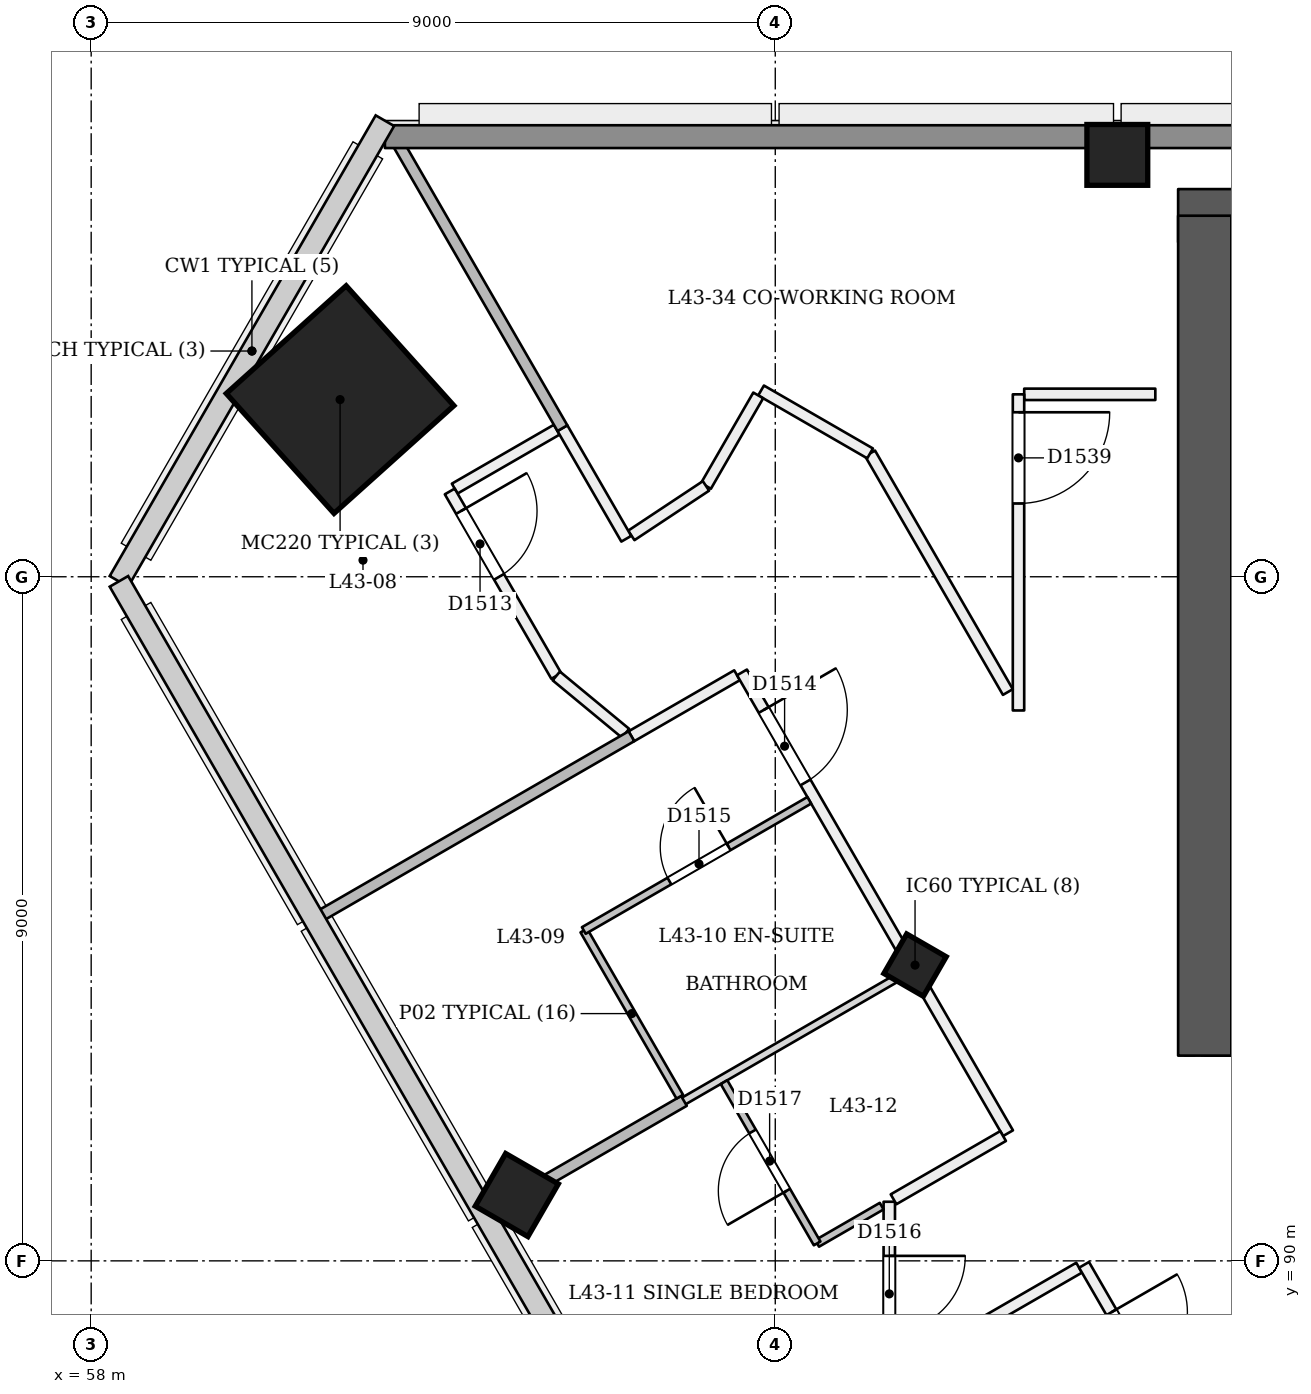
"""IFC4 building model, lengths in metres.
Left out: names, types, materials, properties, quantities, classifications, styles, units other than length and angle.
Written with IfcOpenShell. Run it as: python <this file> out.ifc"""

import sys

from ifc_helpers import new_model, si_unit, direction, frame, frame_2d, origin, origin_2d, place, context, subcontext, project, spatial, rectangle, extrude, element, fill, save


model = new_model("IFC4")
c1 = context("Model", 3, precision=1e-05, world=origin(), true_north=direction((0.0, 1.0)))
c2 = subcontext(c1, "Body", "Model", "MODEL_VIEW")
j1 = project(units=[si_unit("LENGTHUNIT", "METRE"), si_unit("PLANEANGLEUNIT", "RADIAN")], contexts=[c1])
p1 = place(None, origin())
s1 = spatial("IfcSite", under=j1, at=p1, CompositionType="ELEMENT")
p2 = place(p1, origin())
s2 = spatial("IfcBuilding", under=s1, at=p2, CompositionType="ELEMENT")
p3 = place(p2, frame((0.0, 0.0, 167.4)))
s3 = spatial("IfcBuildingStorey", under=s2, at=p3, CompositionType="ELEMENT", Elevation=167.4)
p4 = place(p3, frame((72.65, 93.05, 0.0), z_axis=(0.0, 0.0, 1.0), x_axis=(1.0, 0.0, 0.0)))
e1 = element("IfcWall", 1, at=p4, inside=s3, PredefinedType="SHEAR", context=c2, shape_type="SweptSolid", body=[
    extrude(rectangle(XDim=25.05, YDim=0.7, at=frame_2d((12.525, 0.0))), origin(), (0.0, 0.0, 1.0), 3.6),
])
p5 = place(p4, frame((1.15, 0.0, 0.0)))
e2 = element("IfcOpeningElement", 2, at=p5, cuts=e1, PredefinedType="OPENING", context=c2, shape_type="SweptSolid", body=[
    extrude(rectangle(XDim=1.2, YDim=2.1, at=frame_2d((0.6, 1.05))), frame((0.0, 0.36, 0.0), z_axis=(0.0, -1.0, 0.0), x_axis=(1.0, 0.0, 0.0)), (0.0, 0.0, 1.0), 0.721),
])
p6 = place(p4, frame((3.35, 0.0, 0.0)))
e3 = element("IfcOpeningElement", 3, at=p6, cuts=e1, PredefinedType="OPENING", context=c2, shape_type="SweptSolid", body=[
    extrude(rectangle(XDim=1.2, YDim=2.1, at=frame_2d((0.6, 1.05))), frame((0.0, 0.36, 0.0), z_axis=(0.0, -1.0, 0.0), x_axis=(1.0, 0.0, 0.0)), (0.0, 0.0, 1.0), 0.721),
])
p7 = place(p4, frame((13.35, 0.0, 0.0)))
e4 = element("IfcOpeningElement", 4, at=p7, cuts=e1, PredefinedType="OPENING", context=c2, shape_type="SweptSolid", body=[
    extrude(rectangle(XDim=1.2, YDim=2.1, at=frame_2d((0.6, 1.05))), frame((0.0, 0.36, 0.0), z_axis=(0.0, -1.0, 0.0), x_axis=(1.0, 0.0, 0.0)), (0.0, 0.0, 1.0), 0.721),
])
p8 = place(p4, frame((16.762, 0.0, 0.0)))
e5 = element("IfcOpeningElement", 5, at=p8, cuts=e1, PredefinedType="OPENING", context=c2, shape_type="SweptSolid", body=[
    extrude(rectangle(XDim=1.0, YDim=2.1, at=frame_2d((0.5, 1.05))), frame((0.0, 0.36, 0.0), z_axis=(0.0, -1.0, 0.0), x_axis=(1.0, 0.0, 0.0)), (0.0, 0.0, 1.0), 0.721),
])
p9 = place(p4, frame((20.65, 0.0, 0.0)))
e6 = element("IfcOpeningElement", 6, at=p9, cuts=e1, PredefinedType="OPENING", context=c2, shape_type="SweptSolid", body=[
    extrude(rectangle(XDim=1.0, YDim=2.1, at=frame_2d((0.5, 1.05))), frame((0.0, 0.36, 0.0), z_axis=(0.0, -1.0, 0.0), x_axis=(1.0, 0.0, 0.0)), (0.0, 0.0, 1.0), 0.721),
])
p10 = place(p4, frame((23.087, 0.0, 0.0)))
e7 = element("IfcOpeningElement", 7, at=p10, cuts=e1, PredefinedType="OPENING", context=c2, shape_type="SweptSolid", body=[
    extrude(rectangle(XDim=1.0, YDim=2.1, at=frame_2d((0.5, 1.05))), frame((0.0, 0.36, 0.0), z_axis=(0.0, -1.0, 0.0), x_axis=(1.0, 0.0, 0.0)), (0.0, 0.0, 1.0), 0.721),
])
p11 = place(p3, frame((97.35, 103.75, 0.0), z_axis=(0.0, 0.0, 1.0), x_axis=(-1.0, 0.0, 0.0)))
e8 = element("IfcWall", 8, at=p11, inside=s3, PredefinedType="SHEAR", context=c2, shape_type="SweptSolid", body=[
    extrude(rectangle(XDim=25.05, YDim=0.7, at=frame_2d((12.525, 0.0))), origin(), (0.0, 0.0, 1.0), 3.6),
])
p12 = place(p3, frame((72.65, 103.75, 0.0), z_axis=(0.0, 0.0, 1.0), x_axis=(0.0, -1.0, 0.0)))
e9 = element("IfcWall", 9, at=p12, inside=s3, PredefinedType="SHEAR", context=c2, shape_type="SweptSolid", body=[
    extrude(rectangle(XDim=11.05, YDim=0.7, at=frame_2d((5.525, 0.0))), origin(), (0.0, 0.0, 1.0), 3.6),
])
p13 = place(p3, frame((68.812, 93.844, -0.018), z_axis=(0.022222910879, 0.038415824599, 0.999014697916), x_axis=(-0.866021322354, -0.498527672539, 0.038434736118)))
e10 = element("IfcColumn", 10, at=p13, inside=s3, PredefinedType="COLUMN", context=c2, shape_type="SweptSolid", body=[
    extrude(rectangle(XDim=0.6, YDim=0.6, at=origin_2d()), origin(), (0.0, 0.0, 1.0), 3.604),
])
p14 = place(p3, frame((61.24, 101.32, 0.0), z_axis=(0.028401814599, 0.009218727412, 0.999554076572), x_axis=(-0.865123051177, 0.5011623582, 0.019959885917)))
e11 = element("IfcColumn", 11, at=p14, inside=s3, PredefinedType="COLUMN", context=c2, shape_type="SweptSolid", body=[
    extrude(rectangle(XDim=2.12, YDim=2.12, at=origin_2d()), origin(), (0.0, 0.0, 1.0), 3.602),
])
p15 = place(p3, frame((71.5, 104.55, 0.0), z_axis=(0.0, 0.0, 1.0), x_axis=(1.0, 0.0, 0.0)))
e12 = element("IfcColumn", 12, at=p15, inside=s3, PredefinedType="COLUMN", context=c2, shape_type="SweptSolid", body=[
    extrude(rectangle(XDim=0.8, YDim=0.8, at=origin_2d()), origin(), (0.0, 0.0, 1.0), 3.6),
])
p16 = place(p3, frame((63.572, 90.819, -0.024), z_axis=(0.02222134892, 0.038480872521, 0.999012229206), x_axis=(-0.865642081321, -0.499182199018, 0.038482713395)))
e13 = element("IfcColumn", 13, at=p16, inside=s3, PredefinedType="COLUMN", context=c2, shape_type="SweptSolid", body=[
    extrude(rectangle(XDim=0.8, YDim=0.8, at=origin_2d()), origin(), (0.0, 0.0, 1.0), 3.604),
])
p17 = place(p3, frame((64.125, 100.935, 0.0), z_axis=(0.0, 0.0, 1.0), x_axis=(-0.865975732936, -0.500086022567, 0.0)))
e14 = element("IfcWall", 14, at=p17, inside=s3, PredefinedType="PARTITIONING", context=c2, shape_type="SweptSolid", body=[
    extrude(rectangle(XDim=1.55, YDim=0.15, at=frame_2d((0.775, 0.0))), origin(), (0.0, 0.0, 1.0), 3.15),
])
p18 = place(p3, frame((62.718, 100.122, 0.0), z_axis=(0.0, 0.0, 1.0), x_axis=(0.499961213752, -0.866047795877, 0.0)))
e15 = element("IfcWall", 15, at=p18, inside=s3, PredefinedType="PARTITIONING", context=c2, shape_type="SweptSolid", body=[
    extrude(rectangle(XDim=2.803, YDim=0.15, at=frame_2d((1.401, 0.0))), origin(), (0.0, 0.0, 1.0), 3.15),
])
p19 = place(p18, frame((0.297, 0.0, 0.0)))
e16 = element("IfcOpeningElement", 16, at=p19, cuts=e15, PredefinedType="OPENING", context=c2, shape_type="SweptSolid", body=[
    extrude(rectangle(XDim=1.0, YDim=2.1, at=frame_2d((0.5, 1.05))), frame((0.0, 0.085, 0.0), z_axis=(0.0, -1.0, 0.0), x_axis=(1.0, 0.0, 0.0)), (0.0, 0.0, 1.0), 0.171),
])
p20 = place(p3, frame((64.119, 97.695, 0.0), z_axis=(0.0, 0.0, 1.0), x_axis=(0.770653073213, -0.637254926028, 0.0)))
e17 = element("IfcWall", 17, at=p20, inside=s3, PredefinedType="PARTITIONING", context=c2, shape_type="SweptSolid", body=[
    extrude(rectangle(XDim=1.182, YDim=0.15, at=frame_2d((0.591, 0.0))), origin(), (0.0, 0.0, 1.0), 3.15),
])
p21 = place(p3, frame((65.107, 96.902, 0.0), z_axis=(0.0, 0.0, 1.0), x_axis=(0.866053882819, 0.499950669621, 0.0)))
e18 = element("IfcWall", 18, at=p21, inside=s3, PredefinedType="PARTITIONING", context=c2, shape_type="SweptSolid", body=[
    extrude(rectangle(XDim=1.605, YDim=0.15, at=frame_2d((0.803, 0.0))), origin(), (0.0, 0.0, 1.0), 3.15),
])
p22 = place(p3, frame((66.562, 97.742, 0.0), z_axis=(0.0, 0.0, 1.0), x_axis=(0.500010275428, -0.866019471182, 0.0)))
e19 = element("IfcWall", 19, at=p22, inside=s3, PredefinedType="PARTITIONING", context=c2, shape_type="SweptSolid", body=[
    extrude(rectangle(XDim=7.0, YDim=0.15, at=frame_2d((3.5, 0.0))), origin(), (0.0, 0.0, 1.0), 2.75),
])
p23 = place(p22, frame((0.571, 0.0, 0.0)))
e20 = element("IfcOpeningElement", 20, at=p23, cuts=e19, PredefinedType="OPENING", context=c2, shape_type="SweptSolid", body=[
    extrude(rectangle(XDim=1.1, YDim=2.1, at=frame_2d((0.55, 1.05))), frame((0.0, 0.085, 0.0), z_axis=(0.0, -1.0, 0.0), x_axis=(1.0, 0.0, 0.0)), (0.0, 0.0, 1.0), 0.171),
])
p24 = place(p3, frame((68.5, 90.778, 0.0), z_axis=(0.0, 0.0, 1.0), x_axis=(0.0, -1.0, 0.0)))
e21 = element("IfcWall", 21, at=p24, inside=s3, PredefinedType="PARTITIONING", context=c2, shape_type="SweptSolid", body=[
    extrude(rectangle(XDim=2.179, YDim=0.15, at=frame_2d((1.09, 0.0))), origin(), (0.0, 0.0, 1.0), 3.15),
])
p25 = place(p24, frame((0.712, 0.0, 0.0)))
e22 = element("IfcOpeningElement", 22, at=p25, cuts=e21, PredefinedType="OPENING", context=c2, shape_type="SweptSolid", body=[
    extrude(rectangle(XDim=1.0, YDim=2.1, at=frame_2d((0.5, 1.05))), frame((0.0, 0.085, 0.0), z_axis=(0.0, -1.0, 0.0), x_axis=(1.0, 0.0, 0.0)), (0.0, 0.0, 1.0), 0.171),
])
p26 = place(p3, frame((69.997, 91.642, 0.0), z_axis=(0.0, 0.0, 1.0), x_axis=(-0.866031670005, -0.49998914643, 0.0)))
e23 = element("IfcWall", 23, at=p26, inside=s3, PredefinedType="PARTITIONING", context=c2, shape_type="SweptSolid", body=[
    extrude(rectangle(XDim=1.664, YDim=0.15, at=frame_2d((0.832, 0.0))), origin(), (0.0, 0.0, 1.0), 3.15),
])
p27 = place(p3, frame((68.572, 88.51, 0.0), z_axis=(0.0, 0.0, 1.0), x_axis=(0.866056369097, 0.49994636267, 0.0)))
e24 = element("IfcWall", 24, at=p27, inside=s3, PredefinedType="PARTITIONING", context=c2, shape_type="SweptSolid", body=[
    extrude(rectangle(XDim=2.8, YDim=0.15, at=frame_2d((1.4, 0.0))), origin(), (0.0, 0.0, 1.0), 3.15),
])
p28 = place(p3, frame((71.062, 89.948, 0.0), z_axis=(0.0, 0.0, 1.0), x_axis=(0.500000184135, -0.866025297474, 0.0)))
e25 = element("IfcWall", 25, at=p28, inside=s3, PredefinedType="PARTITIONING", context=c2, shape_type="SweptSolid", body=[
    extrude(rectangle(XDim=27.875, YDim=0.15, at=frame_2d((13.938, 0.0))), origin(), (0.0, 0.0, 1.0), 2.75),
])
p29 = place(p28, frame((0.72, 0.0, 0.0)))
e26 = element("IfcOpeningElement", 26, at=p29, cuts=e25, PredefinedType="OPENING", context=c2, shape_type="SweptSolid", body=[
    extrude(rectangle(XDim=1.0, YDim=2.1, at=frame_2d((0.5, 1.05))), frame((0.0, 0.085, 0.0), z_axis=(0.0, -1.0, 0.0), x_axis=(1.0, 0.0, 0.0)), (0.0, 0.0, 1.0), 0.171),
])
p30 = place(p28, frame((7.28, 0.0, 0.0)))
e27 = element("IfcOpeningElement", 27, at=p30, cuts=e25, PredefinedType="OPENING", context=c2, shape_type="SweptSolid", body=[
    extrude(rectangle(XDim=1.0, YDim=2.1, at=frame_2d((0.5, 1.05))), frame((0.0, 0.085, 0.0), z_axis=(0.0, -1.0, 0.0), x_axis=(1.0, 0.0, 0.0)), (0.0, 0.0, 1.0), 0.171),
])
p31 = place(p28, frame((11.9, 0.0, 0.0)))
e28 = element("IfcOpeningElement", 28, at=p31, cuts=e25, PredefinedType="OPENING", context=c2, shape_type="SweptSolid", body=[
    extrude(rectangle(XDim=1.2, YDim=2.1, at=frame_2d((0.6, 1.05))), frame((0.0, 0.085, 0.0), z_axis=(0.0, -1.0, 0.0), x_axis=(1.0, 0.0, 0.0)), (0.0, 0.0, 1.0), 0.171),
])
p32 = place(p28, frame((19.75, 0.0, 0.0)))
e29 = element("IfcOpeningElement", 29, at=p32, cuts=e25, PredefinedType="OPENING", context=c2, shape_type="SweptSolid", body=[
    extrude(rectangle(XDim=1.0, YDim=2.1, at=frame_2d((0.5, 1.05))), frame((0.0, 0.085, 0.0), z_axis=(0.0, -1.0, 0.0), x_axis=(1.0, 0.0, 0.0)), (0.0, 0.0, 1.0), 0.171),
])
p33 = place(p28, frame((26.051, 0.0, 0.0)))
e30 = element("IfcOpeningElement", 30, at=p33, cuts=e25, PredefinedType="OPENING", context=c2, shape_type="SweptSolid", body=[
    extrude(rectangle(XDim=1.2, YDim=2.1, at=frame_2d((0.6, 1.05))), frame((0.0, 0.085, 0.0), z_axis=(0.0, -1.0, 0.0), x_axis=(1.0, 0.0, 0.0)), (0.0, 0.0, 1.0), 0.171),
])
p34 = place(p3, frame((72.0, 101.4, 0.0), z_axis=(0.0, 0.0, 1.0), x_axis=(-1.0, 0.0, 0.0)))
e31 = element("IfcWall", 31, at=p34, inside=s3, PredefinedType="PARTITIONING", context=c2, shape_type="SweptSolid", body=[
    extrude(rectangle(XDim=1.725, YDim=0.15, at=frame_2d((0.863, 0.0))), origin(), (0.0, 0.0, 1.0), 3.15),
])
p35 = place(p3, frame((70.2, 101.4, 0.0), z_axis=(0.0, 0.0, 1.0), x_axis=(0.0, -1.0, 0.0)))
e32 = element("IfcWall", 32, at=p35, inside=s3, PredefinedType="PARTITIONING", context=c2, shape_type="SweptSolid", body=[
    extrude(rectangle(XDim=4.159, YDim=0.15, at=frame_2d((2.08, 0.0))), origin(), (0.0, 0.0, 1.0), 3.15),
])
p36 = place(p35, frame((0.236, 0.0, 0.0)))
e33 = element("IfcOpeningElement", 33, at=p36, cuts=e32, PredefinedType="OPENING", context=c2, shape_type="SweptSolid", body=[
    extrude(rectangle(XDim=1.2, YDim=2.1, at=frame_2d((0.6, 1.05))), frame((0.0, 0.085, 0.0), z_axis=(0.0, -1.0, 0.0), x_axis=(1.0, 0.0, 0.0)), (0.0, 0.0, 1.0), 0.171),
])
p37 = place(p3, frame((70.06, 97.483, 0.0), z_axis=(0.0, 0.0, 1.0), x_axis=(-0.500013916395, 0.866017369001, 0.0)))
e34 = element("IfcWall", 34, at=p37, inside=s3, PredefinedType="PARTITIONING", context=c2, shape_type="SweptSolid", body=[
    extrude(rectangle(XDim=3.625, YDim=0.15, at=frame_2d((1.813, 0.0))), origin(), (0.0, 0.0, 1.0), 3.15),
])
p38 = place(p3, frame((68.247, 100.623, 0.0), z_axis=(0.0, 0.0, 1.0), x_axis=(-0.866011236992, 0.500024536802, 0.0)))
e35 = element("IfcWall", 35, at=p38, inside=s3, PredefinedType="PARTITIONING", context=c2, shape_type="SweptSolid", body=[
    extrude(rectangle(XDim=1.656, YDim=0.15, at=frame_2d((0.828, 0.0))), origin(), (0.0, 0.0, 1.0), 3.15),
])
p39 = place(p3, frame((66.776, 101.386, 0.0), z_axis=(0.0, 0.0, 1.0), x_axis=(-0.499958106649, -0.866049589571, 0.0)))
e36 = element("IfcWall", 36, at=p39, inside=s3, PredefinedType="PARTITIONING", context=c2, shape_type="SweptSolid", body=[
    extrude(rectangle(XDim=1.375, YDim=0.15, at=frame_2d((0.688, 0.0))), origin(), (0.0, 0.0, 1.0), 3.15),
])
p40 = place(p3, frame((66.088, 100.195, 0.0), z_axis=(0.0, 0.0, 1.0), x_axis=(-0.833577242452, -0.552402915331, 0.0)))
e37 = element("IfcWall", 37, at=p40, inside=s3, PredefinedType="PARTITIONING", context=c2, shape_type="SweptSolid", body=[
    extrude(rectangle(XDim=1.178, YDim=0.15, at=frame_2d((0.589, 0.0))), origin(), (0.0, 0.0, 1.0), 3.15),
])
p41 = place(p3, frame((65.04, 99.5, 0.0), z_axis=(0.0, 0.0, 1.0), x_axis=(-0.500062097304, 0.865989548921, 0.0)))
e38 = element("IfcWall", 38, at=p41, inside=s3, PredefinedType="PARTITIONING", context=c2, shape_type="SweptSolid", body=[
    extrude(rectangle(XDim=1.68, YDim=0.15, at=frame_2d((0.84, 0.0))), origin(), (0.0, 0.0, 1.0), 3.15),
])
p42 = place(p3, frame((61.002, 94.532, 0.0), z_axis=(0.0, 0.0, 1.0), x_axis=(0.866015756104, 0.5000167099, 0.0)))
e39 = element("IfcWall", 39, at=p42, inside=s3, PredefinedType="PARTITIONING", context=c2, shape_type="SweptSolid", body=[
    extrude(rectangle(XDim=4.74, YDim=0.15, at=frame_2d((2.37, 0.0))), origin(), (0.0, 0.0, 1.0), 2.65),
])
p43 = place(p3, frame((64.2, 100.955, 0.0), z_axis=(0.0, 0.0, 1.0), x_axis=(-0.499983800959, 0.866034756103, 0.0)))
e40 = element("IfcWall", 40, at=p43, inside=s3, PredefinedType="PARTITIONING", context=c2, shape_type="SweptSolid", body=[
    extrude(rectangle(XDim=4.555, YDim=0.15, at=frame_2d((2.278, 0.0))), origin(), (0.0, 0.0, 1.0), 2.65),
])
p44 = place(p3, frame((65.744, 92.16, 0.0), z_axis=(0.0, 0.0, 1.0), x_axis=(-0.50001820224, 0.866014894461, 0.0)))
e41 = element("IfcWall", 41, at=p44, inside=s3, PredefinedType="PARTITIONING", context=c2, shape_type="SweptSolid", body=[
    extrude(rectangle(XDim=2.525, YDim=0.1, at=frame_2d((1.262, 0.0))), origin(), (0.0, 0.0, 1.0), 2.75),
])
p45 = place(p3, frame((64.481, 94.346, 0.0), z_axis=(0.0, 0.0, 1.0), x_axis=(0.866001587311, 0.500041249073, 0.0)))
e42 = element("IfcWall", 42, at=p45, inside=s3, PredefinedType="PARTITIONING", context=c2, shape_type="SweptSolid", body=[
    extrude(rectangle(XDim=3.425, YDim=0.1, at=frame_2d((1.712, 0.0))), origin(), (0.0, 0.0, 1.0), 3.15),
])
p46 = place(p45, frame((1.3, 0.0, 0.0)))
e43 = element("IfcOpeningElement", 43, at=p46, cuts=e42, PredefinedType="OPENING", context=c2, shape_type="SweptSolid", body=[
    extrude(rectangle(XDim=0.9, YDim=2.1, at=frame_2d((0.45, 1.05))), frame((0.0, 0.061, 0.0), z_axis=(0.0, -1.0, 0.0), x_axis=(1.0, 0.0, 0.0)), (0.0, 0.0, 1.0), 0.121),
])
p47 = place(p3, frame((63.27, 90.645, 0.0), z_axis=(0.0, 0.0, 1.0), x_axis=(0.865975318022, 0.500086741053, 0.0)))
e44 = element("IfcWall", 44, at=p47, inside=s3, PredefinedType="PARTITIONING", context=c2, shape_type="SweptSolid", body=[
    extrude(rectangle(XDim=2.92, YDim=0.15, at=frame_2d((1.46, 0.0))), origin(), (0.0, 0.0, 1.0), 2.65),
])
p48 = place(p3, frame((65.764, 92.085, 0.0), z_axis=(0.0, 0.0, 1.0), x_axis=(0.866032163869, 0.499988291006, 0.0)))
e45 = element("IfcWall", 45, at=p48, inside=s3, PredefinedType="PARTITIONING", context=c2, shape_type="SweptSolid", body=[
    extrude(rectangle(XDim=3.445, YDim=0.1, at=frame_2d((1.722, 0.0))), origin(), (0.0, 0.0, 1.0), 2.75),
])
p49 = place(p3, frame((68.4, 90.72, 0.0), z_axis=(0.0, 0.0, 1.0), x_axis=(-0.865920189979, -0.500182191394, 0.0)))
e46 = element("IfcWall", 46, at=p49, inside=s3, PredefinedType="PARTITIONING", context=c2, shape_type="SweptSolid", body=[
    extrude(rectangle(XDim=0.981, YDim=0.1, at=frame_2d((0.49, 0.0))), origin(), (0.0, 0.0, 1.0), 3.15),
])
p50 = place(p3, frame((67.551, 90.229, 0.0), z_axis=(0.0, 0.0, 1.0), x_axis=(-0.500018594424, 0.866014668023, 0.0)))
e47 = element("IfcWall", 47, at=p50, inside=s3, PredefinedType="PARTITIONING", context=c2, shape_type="SweptSolid", body=[
    extrude(rectangle(XDim=2.45, YDim=0.1, at=frame_2d((1.225, 0.0))), origin(), (0.0, 0.0, 1.0), 2.75),
])
p51 = place(p50, frame((0.8, 0.0, 0.0)))
e48 = element("IfcOpeningElement", 48, at=p51, cuts=e47, PredefinedType="OPENING", context=c2, shape_type="SweptSolid", body=[
    extrude(rectangle(XDim=0.9, YDim=2.1, at=frame_2d((0.45, 1.05))), frame((0.0, 0.061, 0.0), z_axis=(0.0, -1.0, 0.0), x_axis=(1.0, 0.0, 0.0)), (0.0, 0.0, 1.0), 0.121),
])
p52 = place(p3, frame((61.864, 104.79, 0.0), z_axis=(0.0, 0.0, 1.0), x_axis=(1.0, 0.0, 0.0)))
e49 = element("IfcWall", 49, at=p52, inside=s3, PredefinedType="SOLIDWALL", context=c2, shape_type="SweptSolid", body=[
    extrude(rectangle(XDim=46.271, YDim=0.3, at=frame_2d((23.136, 0.0))), origin(), (0.0, 0.0, 1.0), 2.65),
])
p53 = place(p19, origin())
e50 = element("IfcDoor", 50, at=p53, inside=s3, OperationType="SINGLE_SWING_LEFT", PredefinedType="NOTDEFINED", context=c2, shape_type="SweptSolid", body=[
    extrude(rectangle(XDim=1.0, YDim=2.1, at=frame_2d((0.5, 1.05))), frame((0.0, 0.025, 0.0), z_axis=(0.0, -1.0, 0.0), x_axis=(1.0, 0.0, 0.0)), (0.0, 0.0, 1.0), 0.05),
])
fill(e16, e50)
p54 = place(p23, origin())
e51 = element("IfcDoor", 51, at=p54, inside=s3, OperationType="SINGLE_SWING_LEFT", PredefinedType="NOTDEFINED", context=c2, shape_type="SweptSolid", body=[
    extrude(rectangle(XDim=1.1, YDim=2.1, at=frame_2d((0.55, 1.05))), frame((0.0, 0.025, 0.0), z_axis=(0.0, -1.0, 0.0), x_axis=(1.0, 0.0, 0.0)), (0.0, 0.0, 1.0), 0.05),
])
fill(e20, e51)
p55 = place(p46, origin())
e52 = element("IfcDoor", 52, at=p55, inside=s3, OperationType="SINGLE_SWING_RIGHT", PredefinedType="NOTDEFINED", context=c2, shape_type="SweptSolid", body=[
    extrude(rectangle(XDim=0.9, YDim=2.1, at=frame_2d((0.45, 1.05))), frame((0.0, 0.025, 0.0), z_axis=(0.0, -1.0, 0.0), x_axis=(1.0, 0.0, 0.0)), (0.0, 0.0, 1.0), 0.05),
])
fill(e43, e52)
p56 = place(p25, origin())
e53 = element("IfcDoor", 53, at=p56, inside=s3, OperationType="SINGLE_SWING_LEFT", PredefinedType="NOTDEFINED", context=c2, shape_type="SweptSolid", body=[
    extrude(rectangle(XDim=1.0, YDim=2.1, at=frame_2d((0.5, 1.05))), frame((0.0, 0.025, 0.0), z_axis=(0.0, -1.0, 0.0), x_axis=(1.0, 0.0, 0.0)), (0.0, 0.0, 1.0), 0.05),
])
fill(e22, e53)
p57 = place(p51, origin())
e54 = element("IfcDoor", 54, at=p57, inside=s3, OperationType="SINGLE_SWING_LEFT", PredefinedType="NOTDEFINED", context=c2, shape_type="SweptSolid", body=[
    extrude(rectangle(XDim=0.9, YDim=2.1, at=frame_2d((0.45, 1.05))), frame((0.0, 0.025, 0.0), z_axis=(0.0, -1.0, 0.0), x_axis=(1.0, 0.0, 0.0)), (0.0, 0.0, 1.0), 0.05),
])
fill(e48, e54)
p58 = place(p29, origin())
e55 = element("IfcDoor", 55, at=p58, inside=s3, OperationType="SINGLE_SWING_LEFT", PredefinedType="NOTDEFINED", context=c2, shape_type="SweptSolid", body=[
    extrude(rectangle(XDim=1.0, YDim=2.1, at=frame_2d((0.5, 1.05))), frame((0.0, 0.025, 0.0), z_axis=(0.0, -1.0, 0.0), x_axis=(1.0, 0.0, 0.0)), (0.0, 0.0, 1.0), 0.05),
])
fill(e26, e55)
p59 = place(p36, origin())
e56 = element("IfcDoor", 56, at=p59, inside=s3, OperationType="SINGLE_SWING_LEFT", PredefinedType="NOTDEFINED", context=c2, shape_type="SweptSolid", body=[
    extrude(rectangle(XDim=1.2, YDim=2.1, at=frame_2d((0.6, 1.05))), frame((0.0, 0.025, 0.0), z_axis=(0.0, -1.0, 0.0), x_axis=(1.0, 0.0, 0.0)), (0.0, 0.0, 1.0), 0.05),
])
fill(e33, e56)
save(model, sys.argv[1])
